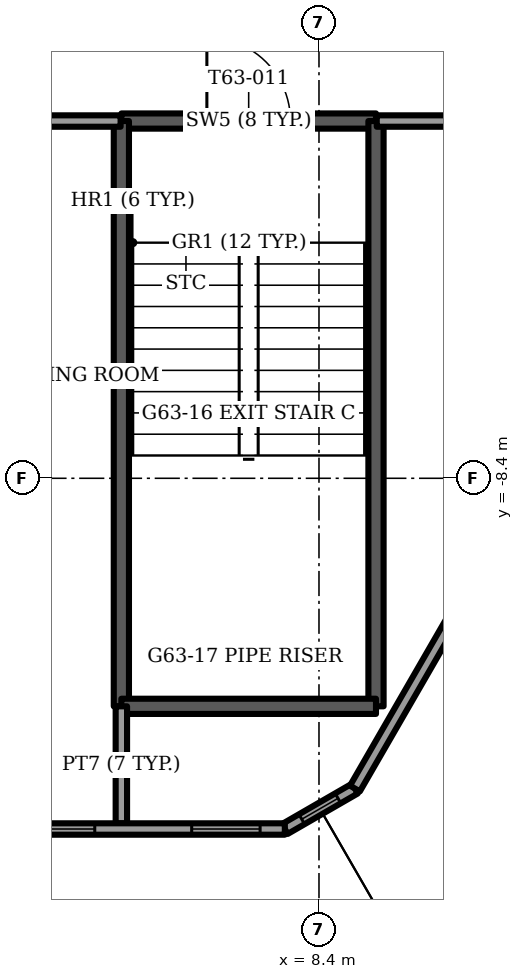
"""IFC4 building model, lengths in metres.
Left out: names, types, materials, properties, quantities, classifications, styles, units other than length and angle.
Written with IfcOpenShell. Run it as: python <this file> out.ifc"""

import sys

from ifc_helpers import new_model, si_unit, direction, frame, frame_2d, origin, place, context, subcontext, project, spatial, rectangle, extrude, element, fill, save


model = new_model("IFC4")
c1 = context("Model", 3, precision=1e-05, world=origin(), true_north=direction((0.0, 1.0)))
c2 = subcontext(c1, "Body", "Model", "MODEL_VIEW")
j1 = project(units=[si_unit("LENGTHUNIT", "METRE"), si_unit("PLANEANGLEUNIT", "RADIAN")], contexts=[c1])
p1 = place(None, origin())
s1 = spatial("IfcSite", under=j1, at=p1, CompositionType="ELEMENT")
p2 = place(p1, origin())
s2 = spatial("IfcBuilding", under=s1, at=p2, CompositionType="ELEMENT")
p3 = place(p2, frame((0.0, 0.0, 256.25)))
s3 = spatial("IfcBuildingStorey", under=s2, at=p3, CompositionType="ELEMENT", Elevation=256.25)
p4 = place(p3, frame((-7.951, -13.014, 0.0), z_axis=(0.0, 0.0, 1.0), x_axis=(1.0, 0.0, 0.0)))
e1 = element("IfcWall", 1, at=p4, inside=s3, PredefinedType="SOLIDWALL", context=c2, shape_type="SweptSolid", body=[
    extrude(rectangle(XDim=15.901, YDim=0.15, at=frame_2d((7.951, 0.0))), origin(), (0.0, 0.0, 1.0), 3.45),
])
p5 = place(p4, frame((2.501, 0.0, 0.15)))
e2 = element("IfcOpeningElement", 2, at=p5, cuts=e1, PredefinedType="OPENING", context=c2, shape_type="SweptSolid", body=[
    extrude(rectangle(XDim=1.5, YDim=2.85, at=frame_2d((0.75, 1.425))), frame((0.0, 0.075, 0.0), z_axis=(0.0, -1.0, 0.0), x_axis=(1.0, 0.0, 0.0)), (0.0, 0.0, 1.0), 0.15),
])
p6 = place(p4, frame((4.101, 0.0, 0.15)))
e3 = element("IfcOpeningElement", 3, at=p6, cuts=e1, PredefinedType="OPENING", context=c2, shape_type="SweptSolid", body=[
    extrude(rectangle(XDim=1.4, YDim=2.85, at=frame_2d((0.7, 1.425))), frame((0.0, 0.075, 0.0), z_axis=(0.0, -1.0, 0.0), x_axis=(1.0, 0.0, 0.0)), (0.0, 0.0, 1.0), 0.15),
])
p7 = place(p4, frame((6.201, 0.0, 0.15)))
e4 = element("IfcOpeningElement", 4, at=p7, cuts=e1, PredefinedType="OPENING", context=c2, shape_type="SweptSolid", body=[
    extrude(rectangle(XDim=1.5, YDim=2.85, at=frame_2d((0.75, 1.425))), frame((0.0, 0.075, 0.0), z_axis=(0.0, -1.0, 0.0), x_axis=(1.0, 0.0, 0.0)), (0.0, 0.0, 1.0), 0.15),
])
p8 = place(p4, frame((8.301, 0.0, 0.15)))
e5 = element("IfcOpeningElement", 5, at=p8, cuts=e1, PredefinedType="OPENING", context=c2, shape_type="SweptSolid", body=[
    extrude(rectangle(XDim=1.4, YDim=2.85, at=frame_2d((0.7, 1.425))), frame((0.0, 0.075, 0.0), z_axis=(0.0, -1.0, 0.0), x_axis=(1.0, 0.0, 0.0)), (0.0, 0.0, 1.0), 0.15),
])
p9 = place(p4, frame((10.401, 0.0, 0.15)))
e6 = element("IfcOpeningElement", 6, at=p9, cuts=e1, PredefinedType="OPENING", context=c2, shape_type="SweptSolid", body=[
    extrude(rectangle(XDim=1.5, YDim=2.85, at=frame_2d((0.75, 1.425))), frame((0.0, 0.075, 0.0), z_axis=(0.0, -1.0, 0.0), x_axis=(1.0, 0.0, 0.0)), (0.0, 0.0, 1.0), 0.15),
])
p10 = place(p4, frame((12.001, 0.0, 0.15)))
e7 = element("IfcOpeningElement", 7, at=p10, cuts=e1, PredefinedType="OPENING", context=c2, shape_type="SweptSolid", body=[
    extrude(rectangle(XDim=1.4, YDim=2.85, at=frame_2d((0.7, 1.425))), frame((0.0, 0.075, 0.0), z_axis=(0.0, -1.0, 0.0), x_axis=(1.0, 0.0, 0.0)), (0.0, 0.0, 1.0), 0.15),
])
p11 = place(p4, frame((0.325, 0.0, 0.15)))
e8 = element("IfcOpeningElement", 8, at=p11, cuts=e1, PredefinedType="OPENING", context=c2, shape_type="SweptSolid", body=[
    extrude(rectangle(XDim=0.9, YDim=2.73, at=frame_2d((0.45, 1.365))), frame((0.0, 0.075, 0.0), z_axis=(0.0, -1.0, 0.0), x_axis=(1.0, 0.0, 0.0)), (0.0, 0.0, 1.0), 0.15),
])
p12 = place(p4, frame((14.676, 0.0, 0.15)))
e9 = element("IfcOpeningElement", 9, at=p12, cuts=e1, PredefinedType="OPENING", context=c2, shape_type="SweptSolid", body=[
    extrude(rectangle(XDim=0.9, YDim=2.73, at=frame_2d((0.45, 1.365))), frame((0.0, 0.075, 0.0), z_axis=(0.0, -1.0, 0.0), x_axis=(1.0, 0.0, 0.0)), (0.0, 0.0, 1.0), 0.15),
])
p13 = place(p3, frame((8.873, -12.481, 0.0), z_axis=(0.0, 0.0, 1.0), x_axis=(0.500005990458, 0.866021945164, 0.0)))
e10 = element("IfcWall", 10, at=p13, inside=s3, PredefinedType="SOLIDWALL", context=c2, shape_type="SweptSolid", body=[
    extrude(rectangle(XDim=12.745, YDim=0.15, at=frame_2d((6.373, 0.0))), origin(), (0.0, 0.0, 1.0), 3.45),
])
p14 = place(p13, frame((2.473, 0.0, 0.15)))
e11 = element("IfcOpeningElement", 11, at=p14, cuts=e10, PredefinedType="OPENING", context=c2, shape_type="SweptSolid", body=[
    extrude(rectangle(XDim=1.5, YDim=2.85, at=frame_2d((0.75, 1.425))), frame((0.0, 0.075, 0.0), z_axis=(0.0, -1.0, 0.0), x_axis=(1.0, 0.0, 0.0)), (0.0, 0.0, 1.0), 0.15),
])
p15 = place(p13, frame((4.673, 0.0, 0.0)))
e12 = element("IfcOpeningElement", 12, at=p15, cuts=e10, PredefinedType="OPENING", context=c2, shape_type="SweptSolid", body=[
    extrude(rectangle(XDim=1.4, YDim=2.4, at=frame_2d((0.7, 1.2))), frame((0.0, 0.075, 0.0), z_axis=(0.0, -1.0, 0.0), x_axis=(1.0, 0.0, 0.0)), (0.0, 0.0, 1.0), 0.15),
])
p16 = place(p13, frame((6.673, 0.0, 0.15)))
e13 = element("IfcOpeningElement", 13, at=p16, cuts=e10, PredefinedType="OPENING", context=c2, shape_type="SweptSolid", body=[
    extrude(rectangle(XDim=0.9, YDim=2.85, at=frame_2d((0.45, 1.425))), frame((0.0, 0.075, 0.0), z_axis=(0.0, -1.0, 0.0), x_axis=(1.0, 0.0, 0.0)), (0.0, 0.0, 1.0), 0.15),
])
p17 = place(p13, frame((7.866, 0.0, 0.0)))
e14 = element("IfcOpeningElement", 14, at=p17, cuts=e10, PredefinedType="OPENING", context=c2, shape_type="SweptSolid", body=[
    extrude(rectangle(XDim=1.4, YDim=2.4, at=frame_2d((0.7, 1.2))), frame((0.0, 0.075, 0.0), z_axis=(0.0, -1.0, 0.0), x_axis=(1.0, 0.0, 0.0)), (0.0, 0.0, 1.0), 0.15),
])
p18 = place(p13, frame((10.959, 0.0, 0.15)))
e15 = element("IfcOpeningElement", 15, at=p18, cuts=e10, PredefinedType="OPENING", context=c2, shape_type="SweptSolid", body=[
    extrude(rectangle(XDim=1.5, YDim=2.73, at=frame_2d((0.75, 1.365))), frame((0.0, 0.075, 0.0), z_axis=(0.0, -1.0, 0.0), x_axis=(1.0, 0.0, 0.0)), (0.0, 0.0, 1.0), 0.15),
])
p19 = place(p3, frame((7.951, -13.014, 0.0), z_axis=(0.0, 0.0, 1.0), x_axis=(0.866048165231, 0.499960573946, 0.0)))
e16 = element("IfcWall", 16, at=p19, inside=s3, PredefinedType="SOLIDWALL", context=c2, shape_type="SweptSolid", body=[
    extrude(rectangle(XDim=1.065, YDim=0.15, at=frame_2d((0.532, 0.0))), origin(), (0.0, 0.0, 1.0), 3.45),
])
p20 = place(p19, frame((0.258, 0.0, 0.15)))
e17 = element("IfcOpeningElement", 17, at=p20, cuts=e16, PredefinedType="OPENING", context=c2, shape_type="SweptSolid", body=[
    extrude(rectangle(XDim=0.55, YDim=2.85, at=frame_2d((0.275, 1.425))), frame((0.0, 0.075, 0.0), z_axis=(0.0, -1.0, 0.0), x_axis=(1.0, 0.0, 0.0)), (0.0, 0.0, 1.0), 0.15),
])
p21 = place(p3, frame((5.8, -3.7, -0.3), z_axis=(0.0, 0.0, 1.0), x_axis=(1.0, 0.0, 0.0)))
e18 = element("IfcWall", 18, at=p21, inside=s3, PredefinedType="SOLIDWALL", context=c2, shape_type="SweptSolid", body=[
    extrude(rectangle(XDim=3.35, YDim=0.2, at=frame_2d((1.675, 0.0))), origin(), (0.0, 0.0, 1.0), 3.75),
])
p22 = place(p21, frame((1.125, 0.0, 0.0)))
e19 = element("IfcOpeningElement", 19, at=p22, cuts=e18, PredefinedType="OPENING", context=c2, shape_type="SweptSolid", body=[
    extrude(rectangle(XDim=1.1, YDim=2.1, at=frame_2d((0.55, 1.05))), frame((0.0, 0.1, 0.0), z_axis=(0.0, -1.0, 0.0), x_axis=(1.0, 0.0, 0.0)), (0.0, 0.0, 1.0), 0.2),
])
for number, where, z_axis, x_axis in (
    (20, (5.8, -3.7, -0.3), (0.0, 0.0, 1.0), (0.0, -1.0, 0.0)),
    (21, (9.15, -3.7, -0.3), (0.0, 0.0, 1.0), (0.0, -1.0, 0.0)),
):
    element("IfcWall", number, at=place(p3, frame(where, z_axis=z_axis, x_axis=x_axis)), inside=s3, PredefinedType="SOLIDWALL", context=c2, shape_type="SweptSolid", body=[
        extrude(rectangle(XDim=7.7, YDim=0.2, at=frame_2d((3.85, 0.0))), origin(), (0.0, 0.0, 1.0), 3.75),
    ])
p23 = place(p3, frame((5.8, -11.4, -0.3), z_axis=(0.0, 0.0, 1.0), x_axis=(1.0, 0.0, 0.0)))
e22 = element("IfcWall", 22, at=p23, inside=s3, PredefinedType="SOLIDWALL", context=c2, shape_type="SweptSolid", body=[
    extrude(rectangle(XDim=3.35, YDim=0.2, at=frame_2d((1.675, 0.0))), origin(), (0.0, 0.0, 1.0), 3.75),
])
p24 = place(p3, frame((5.8, -11.4, 0.0), z_axis=(0.0, 0.0, 1.0), x_axis=(0.0, -1.0, 0.0)))
e23 = element("IfcWall", 23, at=p24, inside=s3, PredefinedType="PARTITIONING", context=c2, shape_type="SweptSolid", body=[
    extrude(rectangle(XDim=1.539, YDim=0.15, at=frame_2d((0.77, 0.0))), origin(), (0.0, 0.0, 1.0), 3.45),
])
p25 = place(p3, frame((-13.995, -3.7, 0.0), z_axis=(0.0, 0.0, 1.0), x_axis=(1.0, 0.0, 0.0)))
e24 = element("IfcWall", 24, at=p25, inside=s3, PredefinedType="PARTITIONING", context=c2, shape_type="SweptSolid", body=[
    extrude(rectangle(XDim=19.785, YDim=0.15, at=frame_2d((9.893, 0.0))), origin(), (0.0, 0.0, 1.0), 3.45),
])
p26 = place(p25, frame((13.495, 0.0, 0.0)))
e25 = element("IfcOpeningElement", 25, at=p26, cuts=e24, PredefinedType="OPENING", context=c2, shape_type="SweptSolid", body=[
    extrude(rectangle(XDim=1.0, YDim=2.1, at=frame_2d((0.5, 1.05))), frame((0.0, 0.075, 0.0), z_axis=(0.0, -1.0, 0.0), x_axis=(1.0, 0.0, 0.0)), (0.0, 0.0, 1.0), 0.15),
])
p27 = place(p25, frame((7.27, 0.0, 0.0)))
e26 = element("IfcOpeningElement", 26, at=p27, cuts=e24, PredefinedType="OPENING", context=c2, shape_type="SweptSolid", body=[
    extrude(rectangle(XDim=1.0, YDim=2.1, at=frame_2d((0.5, 1.05))), frame((0.0, 0.075, 0.0), z_axis=(0.0, -1.0, 0.0), x_axis=(1.0, 0.0, 0.0)), (0.0, 0.0, 1.0), 0.15),
])
p28 = place(p25, frame((17.445, 0.0, 0.0)))
e27 = element("IfcOpeningElement", 27, at=p28, cuts=e24, PredefinedType="OPENING", context=c2, shape_type="SweptSolid", body=[
    extrude(rectangle(XDim=1.0, YDim=2.1, at=frame_2d((0.5, 1.05))), frame((0.0, 0.075, 0.0), z_axis=(0.0, -1.0, 0.0), x_axis=(1.0, 0.0, 0.0)), (0.0, 0.0, 1.0), 0.15),
])
p29 = place(p3, frame((9.16, -3.7, 0.0), z_axis=(0.0, 0.0, 1.0), x_axis=(1.0, 0.0, 0.0)))
e28 = element("IfcWall", 28, at=p29, inside=s3, PredefinedType="PARTITIONING", context=c2, shape_type="SweptSolid", body=[
    extrude(rectangle(XDim=4.835, YDim=0.15, at=frame_2d((2.417, 0.0))), origin(), (0.0, 0.0, 1.0), 3.45),
])
p30 = place(p10, origin())
e29 = element("IfcWindow", 29, at=p30, inside=s3, PartitioningType="SINGLE_PANEL", PredefinedType="WINDOW", context=c2, shape_type="SweptSolid", body=[
    extrude(rectangle(XDim=1.4, YDim=2.85, at=frame_2d((0.7, 1.425))), frame((0.0, 0.03, 0.0), z_axis=(0.0, -1.0, 0.0), x_axis=(1.0, 0.0, 0.0)), (0.0, 0.0, 1.0), 0.06),
])
fill(e7, e29)
p31 = place(p12, origin())
e30 = element("IfcWindow", 30, at=p31, inside=s3, PartitioningType="SINGLE_PANEL", PredefinedType="WINDOW", context=c2, shape_type="SweptSolid", body=[
    extrude(rectangle(XDim=0.9, YDim=2.73, at=frame_2d((0.45, 1.365))), frame((0.0, 0.03, 0.0), z_axis=(0.0, -1.0, 0.0), x_axis=(1.0, 0.0, 0.0)), (0.0, 0.0, 1.0), 0.06),
])
fill(e9, e30)
p32 = place(p20, origin())
e31 = element("IfcWindow", 31, at=p32, inside=s3, PartitioningType="SINGLE_PANEL", PredefinedType="WINDOW", context=c2, shape_type="SweptSolid", body=[
    extrude(rectangle(XDim=0.55, YDim=2.85, at=frame_2d((0.275, 1.425))), frame((0.0, 0.03, 0.0), z_axis=(0.0, -1.0, 0.0), x_axis=(1.0, 0.0, 0.0)), (0.0, 0.0, 1.0), 0.06),
])
fill(e17, e31)
p33 = place(p22, origin())
e32 = element("IfcDoor", 32, at=p33, inside=s3, OperationType="SINGLE_SWING_LEFT", PredefinedType="DOOR", context=c2, shape_type="SweptSolid", body=[
    extrude(rectangle(XDim=1.1, YDim=2.1, at=frame_2d((0.55, 1.05))), frame((0.0, 0.025, 0.0), z_axis=(0.0, -1.0, 0.0), x_axis=(1.0, 0.0, 0.0)), (0.0, 0.0, 1.0), 0.05),
])
fill(e19, e32)
save(model, sys.argv[1])
